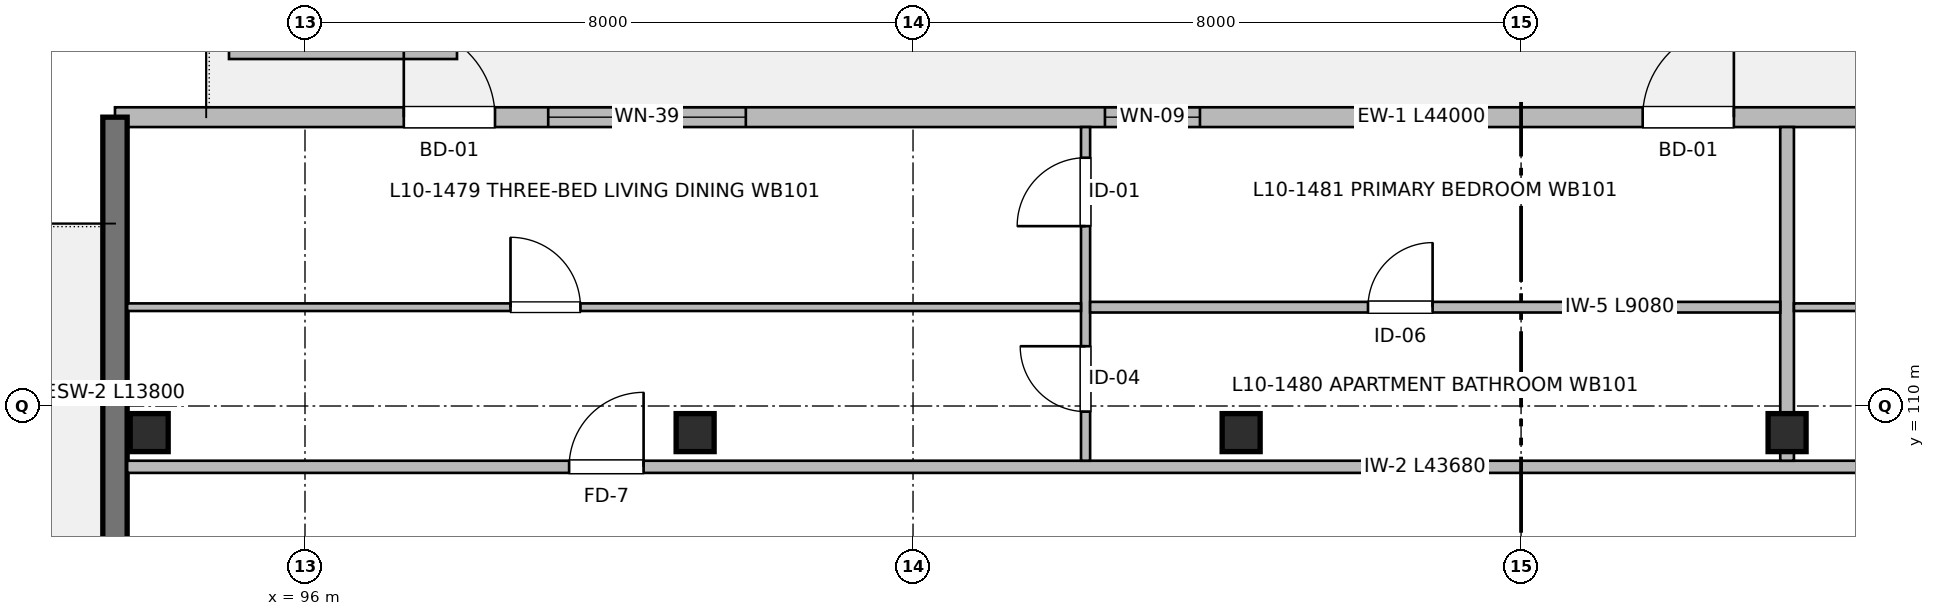
"""IFC4 building model, lengths in metres.
Left out: names, types, materials, properties, quantities, classifications, styles, units other than length and angle.
Written with IfcOpenShell. Run it as: python <this file> out.ifc"""

import sys

from ifc_helpers import new_model, si_unit, direction, frame, frame_2d, origin, origin_2d, place, context, subcontext, project, spatial, rectangle, extrude, element, fill, save


model = new_model("IFC4")
c1 = context("Model", 3, precision=1e-05, world=origin(), true_north=direction((0.0, 1.0)))
c2 = subcontext(c1, "Body", "Model", "MODEL_VIEW")
j1 = project(units=[si_unit("LENGTHUNIT", "METRE"), si_unit("PLANEANGLEUNIT", "RADIAN")], contexts=[c1])
p1 = place(None, origin())
s1 = spatial("IfcSite", under=j1, at=p1, CompositionType="ELEMENT")
p2 = place(p1, origin())
s2 = spatial("IfcBuilding", under=s1, at=p2, CompositionType="ELEMENT")
p3 = place(p2, frame((0.0, 0.0, 32.96)))
s3 = spatial("IfcBuildingStorey", under=s2, at=p3, CompositionType="ELEMENT", Elevation=32.96)
for number, where, z_axis, x_axis in (
    (1, (93.95, 109.65, 0.0), (0.0, 0.0, 1.0), (1.0, 0.0, 0.0)),
    (2, (101.133, 109.65, 0.0), (0.0, 0.0, 1.0), (1.0, 0.0, 0.0)),
    (3, (108.317, 109.65, 0.0), (0.0, 0.0, 1.0), (1.0, 0.0, 0.0)),
    (4, (115.5, 109.65, 0.0), (0.0, 0.0, 1.0), (1.0, 0.0, 0.0)),
):
    element("IfcColumn", number, at=place(p3, frame(where, z_axis=z_axis, x_axis=x_axis)), inside=s3, PredefinedType="COLUMN", context=c2, shape_type="SweptSolid", body=[
        extrude(rectangle(XDim=0.5, YDim=0.5, at=origin_2d()), origin(), (0.0, 0.0, 1.0), 3.2),
    ])
p4 = place(p3, frame((93.5, 113.8, 0.0), z_axis=(0.0, 0.0, 1.0), x_axis=(1.0, 0.0, 0.0)))
e5 = element("IfcWall", 5, at=p4, inside=s3, PredefinedType="SOLIDWALL", context=c2, shape_type="SweptSolid", body=[
    extrude(rectangle(XDim=44.0, YDim=0.26, at=frame_2d((22.0, 0.0))), origin(), (0.0, 0.0, 1.0), 2.98),
])
p5 = place(p4, frame((3.8, 0.0, 0.0)))
e6 = element("IfcOpeningElement", 6, at=p5, cuts=e5, PredefinedType="OPENING", context=c2, shape_type="SweptSolid", body=[
    extrude(rectangle(XDim=1.2, YDim=2.2, at=frame_2d((0.6, 1.1))), frame((0.0, 0.14, 0.0), z_axis=(0.0, -1.0, 0.0), x_axis=(1.0, 0.0, 0.0)), (0.0, 0.0, 1.0), 0.28),
])
p6 = place(p4, frame((5.7, 0.0, 0.67)))
e7 = element("IfcOpeningElement", 7, at=p6, cuts=e5, PredefinedType="OPENING", context=c2, shape_type="SweptSolid", body=[
    extrude(rectangle(XDim=2.6, YDim=1.55, at=frame_2d((1.3, 0.775))), frame((0.0, 0.14, 0.0), z_axis=(0.0, -1.0, 0.0), x_axis=(1.0, 0.0, 0.0)), (0.0, 0.0, 1.0), 0.28),
])
p7 = place(p4, frame((13.025, 0.0, 0.87)))
e8 = element("IfcOpeningElement", 8, at=p7, cuts=e5, PredefinedType="OPENING", context=c2, shape_type="SweptSolid", body=[
    extrude(rectangle(XDim=1.25, YDim=1.35, at=frame_2d((0.625, 0.675))), frame((0.0, 0.14, 0.0), z_axis=(0.0, -1.0, 0.0), x_axis=(1.0, 0.0, 0.0)), (0.0, 0.0, 1.0), 0.28),
])
p8 = place(p4, frame((20.1, 0.0, 0.0)))
e9 = element("IfcOpeningElement", 9, at=p8, cuts=e5, PredefinedType="OPENING", context=c2, shape_type="SweptSolid", body=[
    extrude(rectangle(XDim=1.2, YDim=2.2, at=frame_2d((0.6, 1.1))), frame((0.0, 0.14, 0.0), z_axis=(0.0, -1.0, 0.0), x_axis=(1.0, 0.0, 0.0)), (0.0, 0.0, 1.0), 0.28),
])
p9 = place(p4, frame((23.3, 0.0, 0.72)))
e10 = element("IfcOpeningElement", 10, at=p9, cuts=e5, PredefinedType="OPENING", context=c2, shape_type="SweptSolid", body=[
    extrude(rectangle(XDim=1.8, YDim=1.5, at=frame_2d((0.9, 0.75))), frame((0.0, 0.14, 0.0), z_axis=(0.0, -1.0, 0.0), x_axis=(1.0, 0.0, 0.0)), (0.0, 0.0, 1.0), 0.28),
])
p10 = place(p4, frame((29.75, 0.0, 0.67)))
e11 = element("IfcOpeningElement", 11, at=p10, cuts=e5, PredefinedType="OPENING", context=c2, shape_type="SweptSolid", body=[
    extrude(rectangle(XDim=2.1, YDim=1.55, at=frame_2d((1.05, 0.775))), frame((0.0, 0.14, 0.0), z_axis=(0.0, -1.0, 0.0), x_axis=(1.0, 0.0, 0.0)), (0.0, 0.0, 1.0), 0.28),
])
p11 = place(p4, frame((39.0, 0.0, 0.0)))
e12 = element("IfcOpeningElement", 12, at=p11, cuts=e5, PredefinedType="OPENING", context=c2, shape_type="SweptSolid", body=[
    extrude(rectangle(XDim=1.2, YDim=2.2, at=frame_2d((0.6, 1.1))), frame((0.0, 0.14, 0.0), z_axis=(0.0, -1.0, 0.0), x_axis=(1.0, 0.0, 0.0)), (0.0, 0.0, 1.0), 0.28),
])
p12 = place(p4, frame((40.9, 0.0, 0.77)))
e13 = element("IfcOpeningElement", 13, at=p12, cuts=e5, PredefinedType="OPENING", context=c2, shape_type="SweptSolid", body=[
    extrude(rectangle(XDim=1.65, YDim=1.45, at=frame_2d((0.825, 0.725))), frame((0.0, 0.14, 0.0), z_axis=(0.0, -1.0, 0.0), x_axis=(1.0, 0.0, 0.0)), (0.0, 0.0, 1.0), 0.28),
])
p13 = place(p3, frame((93.5, 100.0, 0.0), z_axis=(0.0, 0.0, 1.0), x_axis=(0.0, 1.0, 0.0)))
e14 = element("IfcWall", 14, at=p13, inside=s3, PredefinedType="SHEAR", context=c2, shape_type="SweptSolid", body=[
    extrude(rectangle(XDim=13.8, YDim=0.32, at=frame_2d((6.9, 0.0))), origin(), (0.0, 0.0, 1.0), 2.98),
])
p14 = place(p13, frame((5.0, 0.0, 0.0)))
e15 = element("IfcOpeningElement", 15, at=p14, cuts=e14, PredefinedType="OPENING", context=c2, shape_type="SweptSolid", body=[
    extrude(rectangle(XDim=1.2, YDim=2.2, at=frame_2d((0.6, 1.1))), frame((0.0, 0.17, 0.0), z_axis=(0.0, -1.0, 0.0), x_axis=(1.0, 0.0, 0.0)), (0.0, 0.0, 1.0), 0.34),
])
p15 = place(p3, frame((95.0, 114.65, 0.0), z_axis=(0.0, 0.0, 1.0), x_axis=(1.0, 0.0, 0.0)))
e16 = element("IfcWall", 16, at=p15, inside=s3, PredefinedType="PARAPET", context=c2, shape_type="SweptSolid", body=[
    extrude(rectangle(XDim=3.0, YDim=0.17, at=frame_2d((1.5, 0.0))), origin(), (0.0, 0.0, 1.0), 0.45),
])
p16 = place(p3, frame((93.66, 109.2, 0.0), z_axis=(0.0, 0.0, 1.0), x_axis=(1.0, 0.0, 0.0)))
e17 = element("IfcWall", 17, at=p16, inside=s3, PredefinedType="PARTITIONING", context=c2, shape_type="SweptSolid", body=[
    extrude(rectangle(XDim=43.68, YDim=0.16, at=frame_2d((21.84, 0.0))), origin(), (0.0, 0.0, 1.0), 2.935),
])
p17 = place(p16, frame((5.815, 0.0, 0.0)))
e18 = element("IfcOpeningElement", 18, at=p17, cuts=e17, PredefinedType="OPENING", context=c2, shape_type="SweptSolid", body=[
    extrude(rectangle(XDim=0.98, YDim=2.15, at=frame_2d((0.49, 1.075))), frame((0.0, 0.09, 0.0), z_axis=(0.0, -1.0, 0.0), x_axis=(1.0, 0.0, 0.0)), (0.0, 0.0, 1.0), 0.18),
])
p18 = place(p16, frame((27.35, 0.0, 0.0)))
e19 = element("IfcOpeningElement", 19, at=p18, cuts=e17, PredefinedType="OPENING", context=c2, shape_type="SweptSolid", body=[
    extrude(rectangle(XDim=0.98, YDim=2.15, at=frame_2d((0.49, 1.075))), frame((0.0, 0.09, 0.0), z_axis=(0.0, -1.0, 0.0), x_axis=(1.0, 0.0, 0.0)), (0.0, 0.0, 1.0), 0.18),
])
p19 = place(p3, frame((115.5, 109.28, 0.0), z_axis=(0.0, 0.0, 1.0), x_axis=(0.0, 1.0, 0.0)))
e20 = element("IfcWall", 20, at=p19, inside=s3, PredefinedType="PARTITIONING", context=c2, shape_type="SweptSolid", body=[
    extrude(rectangle(XDim=4.39, YDim=0.18, at=frame_2d((2.195, 0.0))), origin(), (0.0, 0.0, 1.0), 2.935),
])
p20 = place(p3, frame((106.27, 109.28, 0.0), z_axis=(0.0, 0.0, 1.0), x_axis=(0.0, 1.0, 0.0)))
e21 = element("IfcWall", 21, at=p20, inside=s3, PredefinedType="PARTITIONING", context=c2, shape_type="SweptSolid", body=[
    extrude(rectangle(XDim=4.39, YDim=0.12, at=frame_2d((2.195, 0.0))), origin(), (0.0, 0.0, 1.0), 2.935),
])
p21 = place(p20, frame((0.646, 0.0, 0.0)))
e22 = element("IfcOpeningElement", 22, at=p21, cuts=e21, PredefinedType="OPENING", context=c2, shape_type="SweptSolid", body=[
    extrude(rectangle(XDim=0.86, YDim=2.1, at=frame_2d((0.43, 1.05))), frame((0.0, 0.07, 0.0), z_axis=(0.0, -1.0, 0.0), x_axis=(1.0, 0.0, 0.0)), (0.0, 0.0, 1.0), 0.14),
])
p22 = place(p20, frame((3.086, 0.0, 0.0)))
e23 = element("IfcOpeningElement", 23, at=p22, cuts=e21, PredefinedType="OPENING", context=c2, shape_type="SweptSolid", body=[
    extrude(rectangle(XDim=0.9, YDim=2.1, at=frame_2d((0.45, 1.05))), frame((0.0, 0.07, 0.0), z_axis=(0.0, -1.0, 0.0), x_axis=(1.0, 0.0, 0.0)), (0.0, 0.0, 1.0), 0.14),
])
p23 = place(p3, frame((106.33, 111.3, 0.0), z_axis=(0.0, 0.0, 1.0), x_axis=(1.0, 0.0, 0.0)))
e24 = element("IfcWall", 24, at=p23, inside=s3, PredefinedType="PARTITIONING", context=c2, shape_type="SweptSolid", body=[
    extrude(rectangle(XDim=9.08, YDim=0.14, at=frame_2d((4.54, 0.0))), origin(), (0.0, 0.0, 1.0), 2.935),
])
p24 = place(p23, frame((3.656, 0.0, 0.0)))
e25 = element("IfcOpeningElement", 25, at=p24, cuts=e24, PredefinedType="OPENING", context=c2, shape_type="SweptSolid", body=[
    extrude(rectangle(XDim=0.85, YDim=2.05, at=frame_2d((0.425, 1.025))), frame((0.0, 0.08, 0.0), z_axis=(0.0, -1.0, 0.0), x_axis=(1.0, 0.0, 0.0)), (0.0, 0.0, 1.0), 0.16),
])
p25 = place(p3, frame((93.66, 111.3, 0.0), z_axis=(0.0, 0.0, 1.0), x_axis=(1.0, 0.0, 0.0)))
e26 = element("IfcWall", 26, at=p25, inside=s3, PredefinedType="PARTITIONING", context=c2, shape_type="SweptSolid", body=[
    extrude(rectangle(XDim=12.55, YDim=0.1, at=frame_2d((6.275, 0.0))), origin(), (0.0, 0.0, 1.0), 2.935),
])
p26 = place(p25, frame((5.044, 0.0, 0.0)))
e27 = element("IfcOpeningElement", 27, at=p26, cuts=e26, PredefinedType="OPENING", context=c2, shape_type="SweptSolid", body=[
    extrude(rectangle(XDim=0.92, YDim=2.1, at=frame_2d((0.46, 1.05))), frame((0.0, 0.06, 0.0), z_axis=(0.0, -1.0, 0.0), x_axis=(1.0, 0.0, 0.0)), (0.0, 0.0, 1.0), 0.12),
])
p27 = place(p3, frame((115.59, 111.3, 0.0), z_axis=(0.0, 0.0, 1.0), x_axis=(1.0, 0.0, 0.0)))
e28 = element("IfcWall", 28, at=p27, inside=s3, PredefinedType="PARTITIONING", context=c2, shape_type="SweptSolid", body=[
    extrude(rectangle(XDim=12.56, YDim=0.1, at=frame_2d((6.28, 0.0))), origin(), (0.0, 0.0, 1.0), 2.935),
])
p28 = place(p27, frame((5.048, 0.0, 0.0)))
e29 = element("IfcOpeningElement", 29, at=p28, cuts=e28, PredefinedType="OPENING", context=c2, shape_type="SweptSolid", body=[
    extrude(rectangle(XDim=0.92, YDim=2.1, at=frame_2d((0.46, 1.05))), frame((0.0, 0.06, 0.0), z_axis=(0.0, -1.0, 0.0), x_axis=(1.0, 0.0, 0.0)), (0.0, 0.0, 1.0), 0.12),
])
p29 = place(p5, origin())
e30 = element("IfcDoor", 30, at=p29, inside=s3, OperationType="SINGLE_SWING_LEFT", PredefinedType="DOOR", context=c2, shape_type="SweptSolid", body=[
    extrude(rectangle(XDim=1.2, YDim=2.2, at=frame_2d((0.6, 1.1))), frame((0.0, 0.025, 0.0), z_axis=(0.0, -1.0, 0.0), x_axis=(1.0, 0.0, 0.0)), (0.0, 0.0, 1.0), 0.05),
])
fill(e6, e30)
p30 = place(p6, origin())
e31 = element("IfcWindow", 31, at=p30, inside=s3, PartitioningType="SINGLE_PANEL", PredefinedType="WINDOW", context=c2, shape_type="SweptSolid", body=[
    extrude(rectangle(XDim=2.6, YDim=1.55, at=frame_2d((1.3, 0.775))), frame((0.0, 0.03, 0.0), z_axis=(0.0, -1.0, 0.0), x_axis=(1.0, 0.0, 0.0)), (0.0, 0.0, 1.0), 0.06),
])
fill(e7, e31)
p31 = place(p7, origin())
e32 = element("IfcWindow", 32, at=p31, inside=s3, PartitioningType="SINGLE_PANEL", PredefinedType="WINDOW", context=c2, shape_type="SweptSolid", body=[
    extrude(rectangle(XDim=1.25, YDim=1.35, at=frame_2d((0.625, 0.675))), frame((0.0, 0.03, 0.0), z_axis=(0.0, -1.0, 0.0), x_axis=(1.0, 0.0, 0.0)), (0.0, 0.0, 1.0), 0.06),
])
fill(e8, e32)
p32 = place(p8, origin())
e33 = element("IfcDoor", 33, at=p32, inside=s3, OperationType="SINGLE_SWING_RIGHT", PredefinedType="DOOR", context=c2, shape_type="SweptSolid", body=[
    extrude(rectangle(XDim=1.2, YDim=2.2, at=frame_2d((0.6, 1.1))), frame((0.0, 0.025, 0.0), z_axis=(0.0, -1.0, 0.0), x_axis=(1.0, 0.0, 0.0)), (0.0, 0.0, 1.0), 0.05),
])
fill(e9, e33)
p33 = place(p17, origin())
e34 = element("IfcDoor", 34, at=p33, inside=s3, OperationType="SINGLE_SWING_RIGHT", PredefinedType="DOOR", context=c2, shape_type="SweptSolid", body=[
    extrude(rectangle(XDim=0.98, YDim=2.15, at=frame_2d((0.49, 1.075))), frame((0.0, 0.025, 0.0), z_axis=(0.0, -1.0, 0.0), x_axis=(1.0, 0.0, 0.0)), (0.0, 0.0, 1.0), 0.05),
])
fill(e18, e34)
p34 = place(p26, origin())
e35 = element("IfcDoor", 35, at=p34, inside=s3, OperationType="SINGLE_SWING_LEFT", PredefinedType="DOOR", context=c2, shape_type="SweptSolid", body=[
    extrude(rectangle(XDim=0.92, YDim=2.1, at=frame_2d((0.46, 1.05))), frame((0.0, 0.025, 0.0), z_axis=(0.0, -1.0, 0.0), x_axis=(1.0, 0.0, 0.0)), (0.0, 0.0, 1.0), 0.05),
])
fill(e27, e35)
p35 = place(p21, origin())
e36 = element("IfcDoor", 36, at=p35, inside=s3, OperationType="SINGLE_SWING_RIGHT", PredefinedType="DOOR", context=c2, shape_type="SweptSolid", body=[
    extrude(rectangle(XDim=0.86, YDim=2.1, at=frame_2d((0.43, 1.05))), frame((0.0, 0.025, 0.0), z_axis=(0.0, -1.0, 0.0), x_axis=(1.0, 0.0, 0.0)), (0.0, 0.0, 1.0), 0.05),
])
fill(e22, e36)
p36 = place(p22, origin())
e37 = element("IfcDoor", 37, at=p36, inside=s3, OperationType="SINGLE_SWING_LEFT", PredefinedType="DOOR", context=c2, shape_type="SweptSolid", body=[
    extrude(rectangle(XDim=0.9, YDim=2.1, at=frame_2d((0.45, 1.05))), frame((0.0, 0.025, 0.0), z_axis=(0.0, -1.0, 0.0), x_axis=(1.0, 0.0, 0.0)), (0.0, 0.0, 1.0), 0.05),
])
fill(e23, e37)
p37 = place(p24, origin())
e38 = element("IfcDoor", 38, at=p37, inside=s3, OperationType="SINGLE_SWING_RIGHT", PredefinedType="DOOR", context=c2, shape_type="SweptSolid", body=[
    extrude(rectangle(XDim=0.85, YDim=2.05, at=frame_2d((0.425, 1.025))), frame((0.0, 0.025, 0.0), z_axis=(0.0, -1.0, 0.0), x_axis=(1.0, 0.0, 0.0)), (0.0, 0.0, 1.0), 0.05),
])
fill(e25, e38)
save(model, sys.argv[1])
